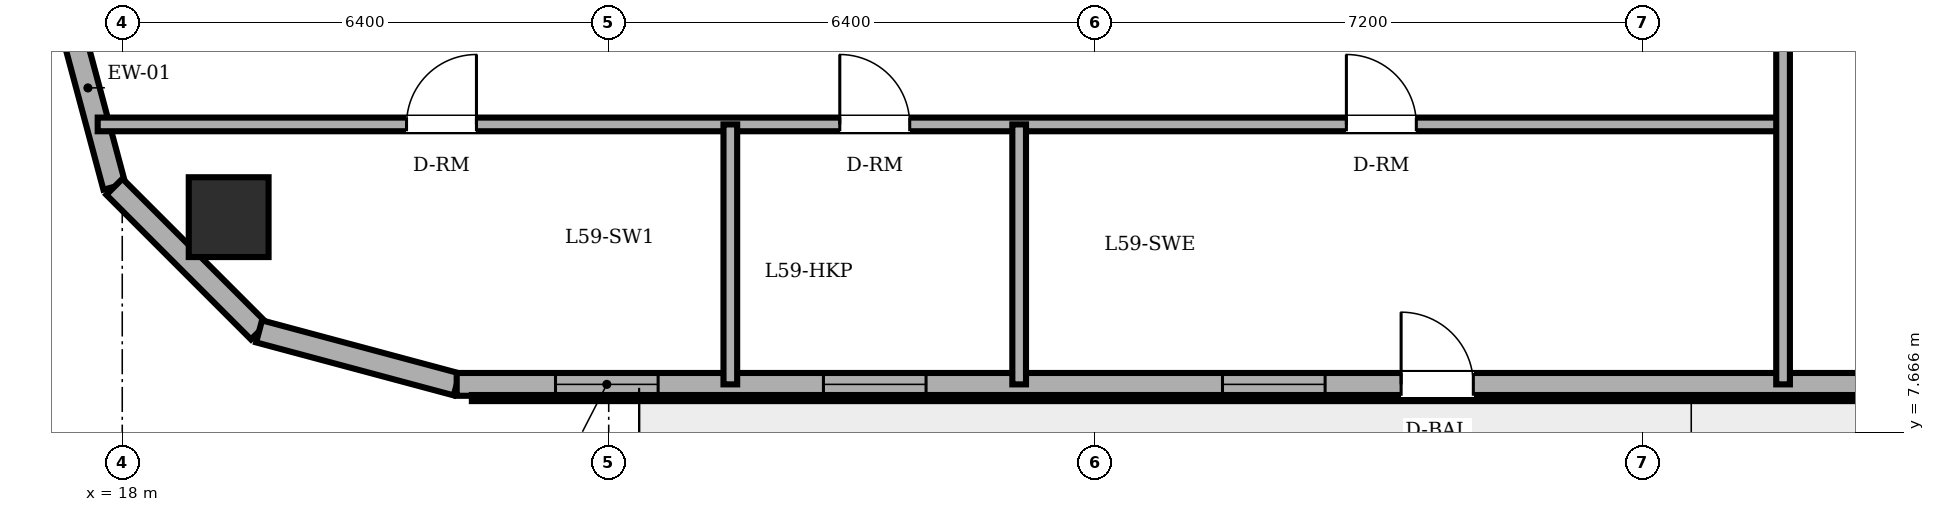
"""IFC4 building model, lengths in metres.
Left out: names, types, materials, properties, quantities, classifications, styles, units other than length and angle.
Written with IfcOpenShell. Run it as: python <this file> out.ifc"""

import sys

from ifc_helpers import new_model, si_unit, direction, frame, frame_2d, origin, origin_2d, place, context, subcontext, project, spatial, rectangle, circle, extrude, element, fill, save


model = new_model("IFC4")
c1 = context("Model", 3, precision=1e-05, world=origin(), true_north=direction((0.0, 1.0)))
c2 = subcontext(c1, "Body", "Model", "MODEL_VIEW")
j1 = project(units=[si_unit("LENGTHUNIT", "METRE"), si_unit("PLANEANGLEUNIT", "RADIAN")], contexts=[c1])
p1 = place(None, origin())
s1 = spatial("IfcSite", under=j1, at=p1, CompositionType="ELEMENT")
p2 = place(p1, origin())
s2 = spatial("IfcBuilding", under=s1, at=p2, CompositionType="ELEMENT")
p3 = place(p2, frame((0.0, 0.0, 226.5)))
s3 = spatial("IfcBuildingStorey", under=s2, at=p3, CompositionType="ELEMENT", Elevation=226.5)
p4 = place(p3, frame((19.4, 10.5, 0.0), z_axis=(0.0, 0.0, 1.0), x_axis=(1.0, 0.0, 0.0)))
e1 = element("IfcColumn", 1, at=p4, inside=s3, PredefinedType="COLUMN", context=c2, shape_type="SweptSolid", body=[
    extrude(circle(Radius=0.525, at=origin_2d()), origin(), (0.0, 0.0, 1.0), 3.6),
])
p5 = place(p3, frame((17.2, 13.5, 0.0), z_axis=(0.0, 0.0, 1.0), x_axis=(0.258932525951, -0.965895412042, 0.0)))
e2 = element("IfcWall", 2, at=p5, inside=s3, PredefinedType="SOLIDWALL", context=c2, shape_type="SweptSolid", body=[
    extrude(rectangle(XDim=2.692, YDim=0.3, at=frame_2d((1.346, 0.0))), origin(), (0.0, 0.0, 1.0), 3.4),
])
p6 = place(p3, frame((17.897, 10.9, 0.0), z_axis=(0.0, 0.0, 1.0), x_axis=(0.707152139074, -0.70706142039, 0.0)))
e3 = element("IfcWall", 3, at=p6, inside=s3, PredefinedType="SOLIDWALL", context=c2, shape_type="SweptSolid", body=[
    extrude(rectangle(XDim=2.691, YDim=0.3, at=frame_2d((1.346, 0.0))), origin(), (0.0, 0.0, 1.0), 3.4),
])
p7 = place(p3, frame((19.8, 8.997, 0.0), z_axis=(0.0, 0.0, 1.0), x_axis=(0.965889330541, -0.258955210695, 0.0)))
e4 = element("IfcWall", 4, at=p7, inside=s3, PredefinedType="SOLIDWALL", context=c2, shape_type="SweptSolid", body=[
    extrude(rectangle(XDim=2.692, YDim=0.3, at=frame_2d((1.346, 0.0))), origin(), (0.0, 0.0, 1.0), 3.4),
])
p8 = place(p3, frame((22.4, 8.3, 0.0), z_axis=(0.0, 0.0, 1.0), x_axis=(1.0, 0.0, 0.0)))
e5 = element("IfcWall", 5, at=p8, inside=s3, PredefinedType="SOLIDWALL", context=c2, shape_type="SweptSolid", body=[
    extrude(rectangle(XDim=32.485, YDim=0.3, at=frame_2d((16.243, 0.0))), origin(), (0.0, 0.0, 1.0), 3.4),
])
p9 = place(p8, frame((12.425, 0.0, 0.0)))
e6 = element("IfcOpeningElement", 6, at=p9, cuts=e5, PredefinedType="OPENING", context=c2, shape_type="SweptSolid", body=[
    extrude(rectangle(XDim=0.95, YDim=2.2, at=frame_2d((0.475, 1.1))), frame((0.0, 0.16, 0.0), z_axis=(0.0, -1.0, 0.0), x_axis=(1.0, 0.0, 0.0)), (0.0, 0.0, 1.0), 0.32),
])
p10 = place(p8, frame((1.3, 0.0, 0.85)))
e7 = element("IfcOpeningElement", 7, at=p10, cuts=e5, PredefinedType="OPENING", context=c2, shape_type="SweptSolid", body=[
    extrude(rectangle(XDim=1.35, YDim=1.55, at=frame_2d((0.675, 0.775))), frame((0.0, 0.16, 0.0), z_axis=(0.0, -1.0, 0.0), x_axis=(1.0, 0.0, 0.0)), (0.0, 0.0, 1.0), 0.32),
])
p11 = place(p8, frame((4.825, 0.0, 0.85)))
e8 = element("IfcOpeningElement", 8, at=p11, cuts=e5, PredefinedType="OPENING", context=c2, shape_type="SweptSolid", body=[
    extrude(rectangle(XDim=1.35, YDim=1.55, at=frame_2d((0.675, 0.775))), frame((0.0, 0.16, 0.0), z_axis=(0.0, -1.0, 0.0), x_axis=(1.0, 0.0, 0.0)), (0.0, 0.0, 1.0), 0.32),
])
p12 = place(p8, frame((10.075, 0.0, 0.85)))
e9 = element("IfcOpeningElement", 9, at=p12, cuts=e5, PredefinedType="OPENING", context=c2, shape_type="SweptSolid", body=[
    extrude(rectangle(XDim=1.35, YDim=1.55, at=frame_2d((0.675, 0.775))), frame((0.0, 0.16, 0.0), z_axis=(0.0, -1.0, 0.0), x_axis=(1.0, 0.0, 0.0)), (0.0, 0.0, 1.0), 0.32),
])
p13 = place(p8, frame((21.67, 0.0, 0.85)))
e10 = element("IfcOpeningElement", 10, at=p13, cuts=e5, PredefinedType="OPENING", context=c2, shape_type="SweptSolid", body=[
    extrude(rectangle(XDim=1.35, YDim=1.55, at=frame_2d((0.675, 0.775))), frame((0.0, 0.16, 0.0), z_axis=(0.0, -1.0, 0.0), x_axis=(1.0, 0.0, 0.0)), (0.0, 0.0, 1.0), 0.32),
])
p14 = place(p8, frame((26.565, 0.0, 0.85)))
e11 = element("IfcOpeningElement", 11, at=p14, cuts=e5, PredefinedType="OPENING", context=c2, shape_type="SweptSolid", body=[
    extrude(rectangle(XDim=1.35, YDim=1.55, at=frame_2d((0.675, 0.775))), frame((0.0, 0.16, 0.0), z_axis=(0.0, -1.0, 0.0), x_axis=(1.0, 0.0, 0.0)), (0.0, 0.0, 1.0), 0.32),
])
p15 = place(p3, frame((17.677, 11.72, 0.0), z_axis=(0.0, 0.0, 1.0), x_axis=(1.0, 0.0, 0.0)))
e12 = element("IfcWall", 12, at=p15, inside=s3, PredefinedType="PARTITIONING", context=c2, shape_type="SweptSolid", body=[
    extrude(rectangle(XDim=22.173, YDim=0.18, at=frame_2d((11.086, 0.0))), origin(), (0.0, 0.0, 1.0), 3.4),
])
p16 = place(p15, frame((9.763, 0.0, 0.0)))
e13 = element("IfcOpeningElement", 13, at=p16, cuts=e12, PredefinedType="OPENING", context=c2, shape_type="SweptSolid", body=[
    extrude(rectangle(XDim=0.92, YDim=2.1, at=frame_2d((0.46, 1.05))), frame((0.0, 0.1, 0.0), z_axis=(0.0, -1.0, 0.0), x_axis=(1.0, 0.0, 0.0)), (0.0, 0.0, 1.0), 0.2),
])
p17 = place(p15, frame((4.063, 0.0, 0.0)))
e14 = element("IfcOpeningElement", 14, at=p17, cuts=e12, PredefinedType="OPENING", context=c2, shape_type="SweptSolid", body=[
    extrude(rectangle(XDim=0.92, YDim=2.1, at=frame_2d((0.46, 1.05))), frame((0.0, 0.1, 0.0), z_axis=(0.0, -1.0, 0.0), x_axis=(1.0, 0.0, 0.0)), (0.0, 0.0, 1.0), 0.2),
])
p18 = place(p15, frame((16.428, 0.0, 0.0)))
e15 = element("IfcOpeningElement", 15, at=p18, cuts=e12, PredefinedType="OPENING", context=c2, shape_type="SweptSolid", body=[
    extrude(rectangle(XDim=0.92, YDim=2.1, at=frame_2d((0.46, 1.05))), frame((0.0, 0.1, 0.0), z_axis=(0.0, -1.0, 0.0), x_axis=(1.0, 0.0, 0.0)), (0.0, 0.0, 1.0), 0.2),
])
for number, where, z_axis, x_axis in (
    (16, (26.0, 8.3, 0.0), (0.0, 0.0, 1.0), (0.0, 1.0, 0.0)),
    (17, (29.8, 8.3, 0.0), (0.0, 0.0, 1.0), (0.0, 1.0, 0.0)),
):
    element("IfcWall", number, at=place(p3, frame(where, z_axis=z_axis, x_axis=x_axis)), inside=s3, PredefinedType="PARTITIONING", context=c2, shape_type="SweptSolid", body=[
        extrude(rectangle(XDim=3.42, YDim=0.18, at=frame_2d((1.71, 0.0))), origin(), (0.0, 0.0, 1.0), 3.4),
    ])
p19 = place(p3, frame((39.85, 8.3, 0.0), z_axis=(0.0, 0.0, 1.0), x_axis=(0.0, 1.0, 0.0)))
e18 = element("IfcWall", 18, at=p19, inside=s3, PredefinedType="PARTITIONING", context=c2, shape_type="SweptSolid", body=[
    extrude(rectangle(XDim=14.52, YDim=0.18, at=frame_2d((7.26, 0.0))), origin(), (0.0, 0.0, 1.0), 3.4),
])
p20 = place(p9, origin())
e19 = element("IfcDoor", 19, at=p20, inside=s3, OperationType="SINGLE_SWING_LEFT", PredefinedType="DOOR", context=c2, shape_type="SweptSolid", body=[
    extrude(rectangle(XDim=0.95, YDim=2.2, at=frame_2d((0.475, 1.1))), frame((0.0, 0.025, 0.0), z_axis=(0.0, -1.0, 0.0), x_axis=(1.0, 0.0, 0.0)), (0.0, 0.0, 1.0), 0.05),
])
fill(e6, e19)
p21 = place(p10, origin())
e20 = element("IfcWindow", 20, at=p21, inside=s3, PartitioningType="SINGLE_PANEL", PredefinedType="WINDOW", context=c2, shape_type="SweptSolid", body=[
    extrude(rectangle(XDim=1.35, YDim=1.55, at=frame_2d((0.675, 0.775))), frame((0.0, 0.03, 0.0), z_axis=(0.0, -1.0, 0.0), x_axis=(1.0, 0.0, 0.0)), (0.0, 0.0, 1.0), 0.06),
])
fill(e7, e20)
p22 = place(p11, origin())
e21 = element("IfcWindow", 21, at=p22, inside=s3, PartitioningType="SINGLE_PANEL", PredefinedType="WINDOW", context=c2, shape_type="SweptSolid", body=[
    extrude(rectangle(XDim=1.35, YDim=1.55, at=frame_2d((0.675, 0.775))), frame((0.0, 0.03, 0.0), z_axis=(0.0, -1.0, 0.0), x_axis=(1.0, 0.0, 0.0)), (0.0, 0.0, 1.0), 0.06),
])
fill(e8, e21)
p23 = place(p12, origin())
e22 = element("IfcWindow", 22, at=p23, inside=s3, PartitioningType="SINGLE_PANEL", PredefinedType="WINDOW", context=c2, shape_type="SweptSolid", body=[
    extrude(rectangle(XDim=1.35, YDim=1.55, at=frame_2d((0.675, 0.775))), frame((0.0, 0.03, 0.0), z_axis=(0.0, -1.0, 0.0), x_axis=(1.0, 0.0, 0.0)), (0.0, 0.0, 1.0), 0.06),
])
fill(e9, e22)
p24 = place(p16, origin())
e23 = element("IfcDoor", 23, at=p24, inside=s3, OperationType="SINGLE_SWING_LEFT", PredefinedType="DOOR", context=c2, shape_type="SweptSolid", body=[
    extrude(rectangle(XDim=0.92, YDim=2.1, at=frame_2d((0.46, 1.05))), frame((0.0, 0.025, 0.0), z_axis=(0.0, -1.0, 0.0), x_axis=(1.0, 0.0, 0.0)), (0.0, 0.0, 1.0), 0.05),
])
fill(e13, e23)
p25 = place(p17, origin())
e24 = element("IfcDoor", 24, at=p25, inside=s3, OperationType="SINGLE_SWING_RIGHT", PredefinedType="DOOR", context=c2, shape_type="SweptSolid", body=[
    extrude(rectangle(XDim=0.92, YDim=2.1, at=frame_2d((0.46, 1.05))), frame((0.0, 0.025, 0.0), z_axis=(0.0, -1.0, 0.0), x_axis=(1.0, 0.0, 0.0)), (0.0, 0.0, 1.0), 0.05),
])
fill(e14, e24)
p26 = place(p18, origin())
e25 = element("IfcDoor", 25, at=p26, inside=s3, OperationType="SINGLE_SWING_LEFT", PredefinedType="DOOR", context=c2, shape_type="SweptSolid", body=[
    extrude(rectangle(XDim=0.92, YDim=2.1, at=frame_2d((0.46, 1.05))), frame((0.0, 0.025, 0.0), z_axis=(0.0, -1.0, 0.0), x_axis=(1.0, 0.0, 0.0)), (0.0, 0.0, 1.0), 0.05),
])
fill(e15, e25)
save(model, sys.argv[1])
